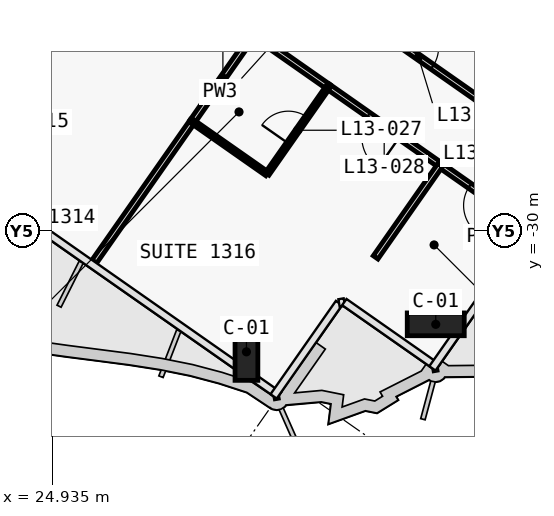
"""IFC4 building model, lengths in metres.
Left out: names, types, materials, properties, quantities, classifications, styles, units other than length and angle.
Written with IfcOpenShell. Run it as: python <this file> out.ifc"""

import sys

from ifc_helpers import new_model, si_unit, direction, frame, frame_2d, origin, origin_2d, place, context, subcontext, project, spatial, rectangle, extrude, clip, halfspace, element, fill, save


model = new_model("IFC4")
c1 = context("Model", 3, precision=1e-05, world=origin(), true_north=direction((0.0, 1.0)))
c2 = subcontext(c1, "Body", "Model", "MODEL_VIEW")
j1 = project(units=[si_unit("LENGTHUNIT", "METRE"), si_unit("PLANEANGLEUNIT", "RADIAN")], contexts=[c1])
p1 = place(None, origin())
s1 = spatial("IfcSite", under=j1, at=p1, CompositionType="ELEMENT")
p2 = place(p1, origin())
s2 = spatial("IfcBuilding", under=s1, at=p2, CompositionType="ELEMENT")
p3 = place(p2, frame((0.0, 0.0, 72.5)))
s3 = spatial("IfcBuildingStorey", under=s2, at=p3, CompositionType="ELEMENT", Elevation=72.5)
p4 = place(p3, frame((30.336, -33.388, 0.0), z_axis=(-0.502949209434, 0.352179537956, 0.789310880309), x_axis=(0.646559152129, -0.45273936053, 0.613993757481)))
e1 = element("IfcColumn", 1, at=p4, inside=s3, PredefinedType="COLUMN", context=c2, shape_type="Clipping", body=[
    clip(clip(extrude(rectangle(XDim=1.5, YDim=0.6, at=origin_2d()), origin(), (0.0, 0.0, 1.0), 4.561), halfspace(frame((0.0, 0.0, 0.583), z_axis=(0.0, 0.0, 1.0), x_axis=(1.0, 0.0, 0.0)), True)), halfspace(frame((0.0, 0.0, 3.977), z_axis=(0.0, 0.0, 1.0), x_axis=(1.0, 0.0, 0.0)), False)),
])
p5 = place(p3, frame((35.141, -32.541, 0.0), z_axis=(-0.502933821481, 0.352125233086, 0.789344912846), x_axis=(0.573540565604, 0.819177160086, 0.0)))
e2 = element("IfcColumn", 2, at=p5, inside=s3, PredefinedType="COLUMN", context=c2, shape_type="Clipping", body=[
    clip(clip(extrude(rectangle(XDim=1.5, YDim=0.6, at=origin_2d()), origin(), (0.0, 0.0, 1.0), 4.561), halfspace(frame((0.0, 0.0, 0.233), z_axis=(0.0, 0.0, 1.0), x_axis=(1.0, 0.0, 0.0)), True)), halfspace(frame((0.0, 0.0, 4.327), z_axis=(0.0, 0.0, 1.0), x_axis=(1.0, 0.0, 0.0)), False)),
])
p6 = place(p3, frame((33.829, -24.908, 0.0), z_axis=(0.0, 0.0, 1.0), x_axis=(0.819150860942, -0.573578126342, 0.0)))
e3 = element("IfcWall", 3, at=p6, inside=s3, PredefinedType="PARTITIONING", context=c2, shape_type="SweptSolid", body=[
    extrude(rectangle(XDim=5.802, YDim=0.15, at=frame_2d((2.901, 0.0))), origin(), (0.0, 0.0, 1.0), 2.5),
])
p7 = place(p6, frame((0.451, 0.0, 0.0)))
e4 = element("IfcOpeningElement", 4, at=p7, cuts=e3, PredefinedType="OPENING", context=c2, shape_type="SweptSolid", body=[
    extrude(rectangle(XDim=0.9, YDim=2.1, at=frame_2d((0.45, 1.05))), frame((0.0, 0.085, 0.0), z_axis=(0.0, -1.0, 0.0), x_axis=(1.0, 0.0, 0.0)), (0.0, 0.0, 1.0), 0.17),
])
p8 = place(p3, frame((35.143, -28.27, 0.0), z_axis=(0.0, 0.0, 1.0), x_axis=(-0.819145961204, 0.573585123798, 0.0)))
e5 = element("IfcWall", 5, at=p8, inside=s3, PredefinedType="PARTITIONING", context=c2, shape_type="SweptSolid", body=[
    extrude(rectangle(XDim=3.603, YDim=0.15, at=frame_2d((1.802, 0.0))), origin(), (0.0, 0.0, 1.0), 2.5),
])
p9 = place(p8, frame((1.302, 0.0, 0.0)))
e6 = element("IfcOpeningElement", 6, at=p9, cuts=e5, PredefinedType="OPENING", context=c2, shape_type="SweptSolid", body=[
    extrude(rectangle(XDim=1.0, YDim=2.1, at=frame_2d((0.5, 1.05))), frame((0.0, 0.085, 0.0), z_axis=(0.0, -1.0, 0.0), x_axis=(1.0, 0.0, 0.0)), (0.0, 0.0, 1.0), 0.17),
])
p10 = place(p3, frame((32.194, -26.205, 0.0), z_axis=(0.0, 0.0, 1.0), x_axis=(-0.819146032251, 0.573585022335, 0.0)))
e7 = element("IfcWall", 7, at=p10, inside=s3, PredefinedType="PARTITIONING", context=c2, shape_type="SweptSolid", body=[
    extrude(rectangle(XDim=2.404, YDim=0.15, at=frame_2d((1.202, 0.0))), origin(), (0.0, 0.0, 1.0), 3.32),
])
p11 = place(p3, frame((37.435, -29.875, 0.0), z_axis=(0.0, 0.0, 1.0), x_axis=(-0.819125488359, 0.573614360281, 0.0)))
e8 = element("IfcWall", 8, at=p11, inside=s3, PredefinedType="PARTITIONING", context=c2, shape_type="SweptSolid", body=[
    extrude(rectangle(XDim=2.802, YDim=0.15, at=frame_2d((1.401, 0.0))), origin(), (0.0, 0.0, 1.0), 2.5),
])
p12 = place(p11, frame((0.951, 0.0, 0.0)))
e9 = element("IfcOpeningElement", 9, at=p12, cuts=e8, PredefinedType="OPENING", context=c2, shape_type="SweptSolid", body=[
    extrude(rectangle(XDim=0.9, YDim=2.1, at=frame_2d((0.45, 1.05))), frame((0.0, 0.085, 0.0), z_axis=(0.0, -1.0, 0.0), x_axis=(1.0, 0.0, 0.0)), (0.0, 0.0, 1.0), 0.17),
])
p13 = place(p3, frame((28.621, -27.12, 0.0), z_axis=(0.0, 0.0, 1.0), x_axis=(-0.573593387921, -0.81914017441, 0.0)))
e10 = element("IfcWall", 10, at=p13, inside=s3, PredefinedType="PARTITIONING", context=c2, shape_type="SweptSolid", body=[
    extrude(rectangle(XDim=4.501, YDim=0.15, at=frame_2d((2.25, 0.0))), origin(), (0.0, 0.0, 1.0), 2.5),
])
p14 = place(p3, frame((30.226, -24.827, 0.0), z_axis=(0.0, 0.0, 1.0), x_axis=(-0.573614360281, -0.819125488359, 0.0)))
e11 = element("IfcWall", 11, at=p14, inside=s3, PredefinedType="PARTITIONING", context=c2, shape_type="SweptSolid", body=[
    extrude(rectangle(XDim=2.802, YDim=0.15, at=frame_2d((1.401, 0.0))), origin(), (0.0, 0.0, 1.0), 3.32),
])
p15 = place(p3, frame((28.62, -27.121, 0.0), z_axis=(0.0, 0.0, 1.0), x_axis=(0.819141114317, -0.573592045652, 0.0)))
e12 = element("IfcWall", 12, at=p15, inside=s3, PredefinedType="PARTITIONING", context=c2, shape_type="SweptSolid", body=[
    extrude(rectangle(XDim=2.4, YDim=0.12, at=frame_2d((1.2, 0.0))), origin(), (0.0, 0.0, 1.0), 3.32),
])
p16 = place(p3, frame((30.587, -28.498, 0.0), z_axis=(0.0, 0.0, 1.0), x_axis=(0.573608623498, 0.819129505664, 0.0)))
e13 = element("IfcWall", 13, at=p16, inside=s3, PredefinedType="PARTITIONING", context=c2, shape_type="SweptSolid", body=[
    extrude(rectangle(XDim=2.8, YDim=0.12, at=frame_2d((1.4, 0.0))), origin(), (0.0, 0.0, 1.0), 3.32),
])
p17 = place(p16, frame((0.975, 0.0, 0.0)))
e14 = element("IfcOpeningElement", 14, at=p17, cuts=e13, PredefinedType="OPENING", context=c2, shape_type="SweptSolid", body=[
    extrude(rectangle(XDim=0.85, YDim=2.05, at=frame_2d((0.425, 1.025))), frame((0.0, 0.07, 0.0), z_axis=(0.0, -1.0, 0.0), x_axis=(1.0, 0.0, 0.0)), (0.0, 0.0, 1.0), 0.14),
])
p18 = place(p3, frame((35.141, -28.268, 0.0), z_axis=(0.0, 0.0, 1.0), x_axis=(-0.573578404522, -0.819150666157, 0.0)))
e15 = element("IfcWall", 15, at=p18, inside=s3, PredefinedType="PARTITIONING", context=c2, shape_type="SweptSolid", body=[
    extrude(rectangle(XDim=2.965, YDim=0.15, at=frame_2d((1.482, 0.0))), origin(), (0.0, 0.0, 1.0), 2.5),
])
p19 = place(p17, origin())
e16 = element("IfcDoor", 16, at=p19, inside=s3, OperationType="SINGLE_SWING_LEFT", PredefinedType="DOOR", context=c2, shape_type="SweptSolid", body=[
    extrude(rectangle(XDim=0.85, YDim=2.05, at=frame_2d((0.425, 1.025))), frame((0.0, 0.025, 0.0), z_axis=(0.0, -1.0, 0.0), x_axis=(1.0, 0.0, 0.0)), (0.0, 0.0, 1.0), 0.05),
])
fill(e14, e16)
p20 = place(p9, origin())
e17 = element("IfcDoor", 17, at=p20, inside=s3, OperationType="SINGLE_SWING_RIGHT", PredefinedType="DOOR", context=c2, shape_type="SweptSolid", body=[
    extrude(rectangle(XDim=1.0, YDim=2.1, at=frame_2d((0.5, 1.05))), frame((0.0, 0.025, 0.0), z_axis=(0.0, -1.0, 0.0), x_axis=(1.0, 0.0, 0.0)), (0.0, 0.0, 1.0), 0.05),
])
fill(e6, e17)
p21 = place(p12, origin())
e18 = element("IfcDoor", 18, at=p21, inside=s3, OperationType="SINGLE_SWING_LEFT", PredefinedType="DOOR", context=c2, shape_type="SweptSolid", body=[
    extrude(rectangle(XDim=0.9, YDim=2.1, at=frame_2d((0.45, 1.05))), frame((0.0, 0.025, 0.0), z_axis=(0.0, -1.0, 0.0), x_axis=(1.0, 0.0, 0.0)), (0.0, 0.0, 1.0), 0.05),
])
fill(e9, e18)
p22 = place(p7, origin())
e19 = element("IfcDoor", 19, at=p22, inside=s3, OperationType="SINGLE_SWING_RIGHT", PredefinedType="DOOR", context=c2, shape_type="SweptSolid", body=[
    extrude(rectangle(XDim=0.9, YDim=2.1, at=frame_2d((0.45, 1.05))), frame((0.0, 0.025, 0.0), z_axis=(0.0, -1.0, 0.0), x_axis=(1.0, 0.0, 0.0)), (0.0, 0.0, 1.0), 0.05),
])
fill(e4, e19)
save(model, sys.argv[1])
